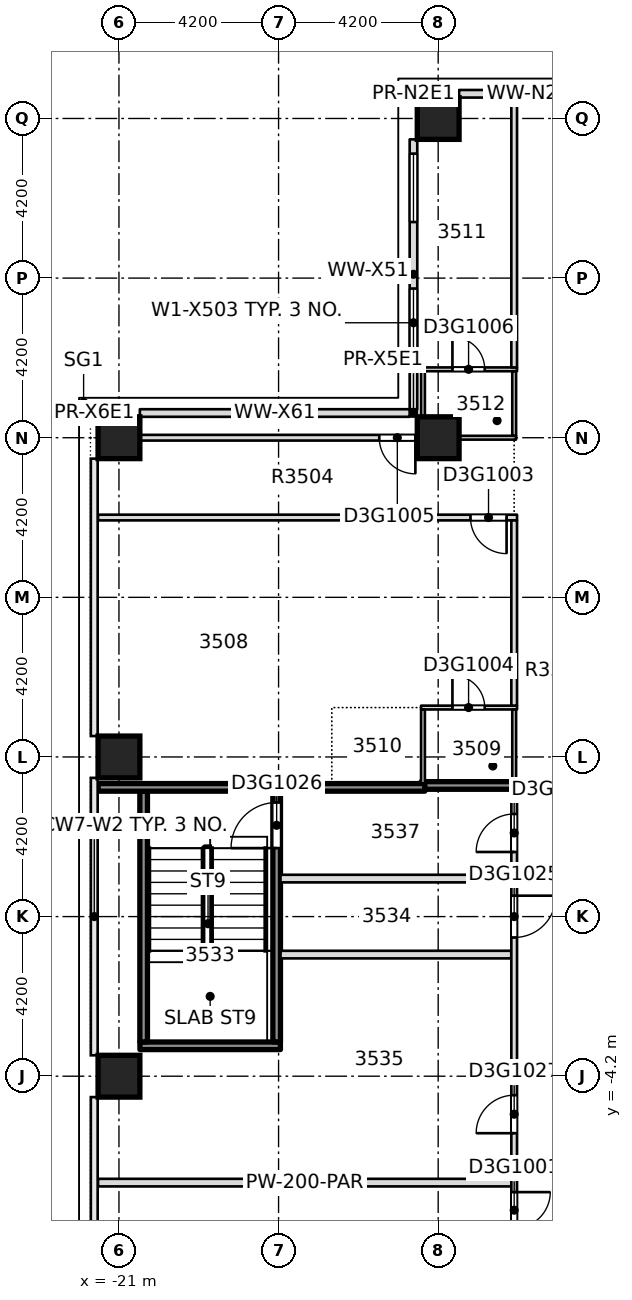
"""IFC4 building model, lengths in metres.
Left out: names, types, materials, properties, quantities, classifications, styles, units other than length and angle.
Written with IfcOpenShell. Run it as: python <this file> out.ifc"""

import sys

from ifc_helpers import new_model, si_unit, direction, frame, frame_2d, origin, origin_2d, place, context, subcontext, project, spatial, rectangle, extrude, element, fill, save


model = new_model("IFC4")
c1 = context("Model", 3, precision=1e-05, world=origin(), true_north=direction((0.0, 1.0)))
c2 = subcontext(c1, "Body", "Model", "MODEL_VIEW")
j1 = project(units=[si_unit("LENGTHUNIT", "METRE"), si_unit("PLANEANGLEUNIT", "RADIAN")], contexts=[c1])
p1 = place(None, origin())
s1 = spatial("IfcSite", under=j1, at=p1, CompositionType="ELEMENT")
p2 = place(p1, origin())
s2 = spatial("IfcBuilding", under=s1, at=p2, CompositionType="ELEMENT")
p3 = place(p2, frame((0.0, 0.0, 140.0)))
s3 = spatial("IfcBuildingStorey", under=s2, at=p3, CompositionType="ELEMENT", Elevation=140.0)
for number, where, z_axis, x_axis in (
    (1, (-21.0, -4.2, -0.4), (0.0, 0.0, 1.0), (1.0, 0.0, 0.0)),
    (2, (-21.0, 4.2, -0.4), (0.0, 0.0, 1.0), (1.0, 0.0, 0.0)),
    (3, (-21.0, 12.6, -0.4), (0.0, 0.0, 1.0), (1.0, 0.0, 0.0)),
    (4, (-12.6, 12.6, -0.4), (0.0, 0.0, 1.0), (1.0, 0.0, 0.0)),
    (5, (-12.6, 21.0, -0.4), (0.0, 0.0, 1.0), (1.0, 0.0, 0.0)),
):
    element("IfcColumn", number, at=place(p3, frame(where, z_axis=z_axis, x_axis=x_axis)), inside=s3, PredefinedType="COLUMN", context=c2, shape_type="SweptSolid", body=[
        extrude(rectangle(XDim=1.1, YDim=1.1, at=origin_2d()), origin(), (0.0, 0.0, 1.0), 3.45),
    ])
p4 = place(p3, frame((-21.55, -7.0, 0.0), z_axis=(0.0, 0.0, 1.0), x_axis=(1.0, 0.0, 0.0)))
e6 = element("IfcWall", 6, at=p4, inside=s3, PredefinedType="PARTITIONING", context=c2, shape_type="SweptSolid", body=[
    extrude(rectangle(XDim=10.875, YDim=0.2, at=frame_2d((5.438, 0.0))), origin(), (0.0, 0.0, 1.0), 3.05),
])
p5 = place(p3, frame((-20.448, -3.4, 0.0), z_axis=(0.0, 0.0, 1.0), x_axis=(1.0, 0.0, 0.0)))
e7 = element("IfcWall", 7, at=p5, inside=s3, PredefinedType="SOLIDWALL", context=c2, shape_type="SweptSolid", body=[
    extrude(rectangle(XDim=3.696, YDim=0.2, at=frame_2d((1.848, 0.0))), origin(), (0.0, 0.0, 1.0), 3.05),
])
p6 = place(p3, frame((-16.748, -1.0, 0.0), z_axis=(0.0, 0.0, 1.0), x_axis=(1.0, 0.0, 0.0)))
e8 = element("IfcWall", 8, at=p6, inside=s3, PredefinedType="PARTITIONING", context=c2, shape_type="SweptSolid", body=[
    extrude(rectangle(XDim=6.071, YDim=0.2, at=frame_2d((3.036, 0.0))), origin(), (0.0, 0.0, 1.0), 3.05),
])
p7 = place(p3, frame((-16.75, 1.0, 0.0), z_axis=(0.0, 0.0, 1.0), x_axis=(1.0, 0.0, 0.0)))
e9 = element("IfcWall", 9, at=p7, inside=s3, PredefinedType="PARTITIONING", context=c2, shape_type="SweptSolid", body=[
    extrude(rectangle(XDim=6.075, YDim=0.2, at=frame_2d((3.038, 0.0))), origin(), (0.0, 0.0, 1.0), 3.05),
])
p8 = place(p3, frame((-13.05, 3.45, 0.0), z_axis=(0.0, 0.0, 1.0), x_axis=(1.0, 0.0, 0.0)))
e10 = element("IfcWall", 10, at=p8, inside=s3, PredefinedType="SOLIDWALL", context=c2, shape_type="SweptSolid", body=[
    extrude(rectangle(XDim=2.525, YDim=0.2, at=frame_2d((1.263, 0.0))), origin(), (0.0, 0.0, 1.0), 3.05),
])
p9 = place(p3, frame((-13.05, 5.5, 0.0), z_axis=(0.0, 0.0, 1.0), x_axis=(1.0, 0.0, 0.0)))
e11 = element("IfcWall", 11, at=p9, inside=s3, PredefinedType="PARTITIONING", context=c2, shape_type="SweptSolid", body=[
    extrude(rectangle(XDim=2.525, YDim=0.1, at=frame_2d((1.263, 0.0))), origin(), (0.0, 0.0, 1.0), 3.05),
])
p10 = place(p9, frame((0.825, 0.0, 0.0)))
e12 = element("IfcOpeningElement", 12, at=p10, cuts=e11, PredefinedType="OPENING", context=c2, shape_type="SweptSolid", body=[
    extrude(rectangle(XDim=0.85, YDim=2.1, at=frame_2d((0.425, 1.05))), frame((0.0, 0.06, 0.0), z_axis=(0.0, -1.0, 0.0), x_axis=(1.0, 0.0, 0.0)), (0.0, 0.0, 1.0), 0.12),
])
p11 = place(p3, frame((-21.55, 10.5, 0.0), z_axis=(0.0, 0.0, 1.0), x_axis=(1.0, 0.0, 0.0)))
e13 = element("IfcWall", 13, at=p11, inside=s3, PredefinedType="PARTITIONING", context=c2, shape_type="SweptSolid", body=[
    extrude(rectangle(XDim=11.025, YDim=0.15, at=frame_2d((5.513, 0.0))), origin(), (0.0, 0.0, 1.0), 3.05),
])
p12 = place(p11, frame((9.8, 0.0, 0.0)))
e14 = element("IfcOpeningElement", 14, at=p12, cuts=e13, PredefinedType="OPENING", context=c2, shape_type="SweptSolid", body=[
    extrude(rectangle(XDim=0.95, YDim=2.1, at=frame_2d((0.475, 1.05))), frame((0.0, 0.085, 0.0), z_axis=(0.0, -1.0, 0.0), x_axis=(1.0, 0.0, 0.0)), (0.0, 0.0, 1.0), 0.17),
])
p13 = place(p3, frame((-21.55, 12.6, 0.0), z_axis=(0.0, 0.0, 1.0), x_axis=(1.0, 0.0, 0.0)))
e15 = element("IfcWall", 15, at=p13, inside=s3, PredefinedType="PARTITIONING", context=c2, shape_type="SweptSolid", body=[
    extrude(rectangle(XDim=1.1, YDim=0.15, at=frame_2d((0.55, 0.0))), origin(), (0.0, 0.0, 1.0), 3.05),
])
p14 = place(p3, frame((-13.05, 12.6, 0.0), z_axis=(0.0, 0.0, 1.0), x_axis=(1.0, 0.0, 0.0)))
e16 = element("IfcWall", 16, at=p14, inside=s3, PredefinedType="PARTITIONING", context=c2, shape_type="SweptSolid", body=[
    extrude(rectangle(XDim=2.5, YDim=0.1, at=frame_2d((1.25, 0.0))), origin(), (0.0, 0.0, 1.0), 3.05),
])
p15 = place(p3, frame((-13.05, 14.4, 0.0), z_axis=(0.0, 0.0, 1.0), x_axis=(1.0, 0.0, 0.0)))
e17 = element("IfcWall", 17, at=p15, inside=s3, PredefinedType="PARTITIONING", context=c2, shape_type="SweptSolid", body=[
    extrude(rectangle(XDim=2.525, YDim=0.1, at=frame_2d((1.263, 0.0))), origin(), (0.0, 0.0, 1.0), 3.05),
])
p16 = place(p15, frame((0.825, 0.0, 0.0)))
e18 = element("IfcOpeningElement", 18, at=p16, cuts=e17, PredefinedType="OPENING", context=c2, shape_type="SweptSolid", body=[
    extrude(rectangle(XDim=0.85, YDim=2.1, at=frame_2d((0.425, 1.05))), frame((0.0, 0.06, 0.0), z_axis=(0.0, -1.0, 0.0), x_axis=(1.0, 0.0, 0.0)), (0.0, 0.0, 1.0), 0.12),
])
p17 = place(p3, frame((-20.35, -3.298, 0.0), z_axis=(0.0, 0.0, 1.0), x_axis=(0.0, 1.0, 0.0)))
e19 = element("IfcWall", 19, at=p17, inside=s3, PredefinedType="SOLIDWALL", context=c2, shape_type="SweptSolid", body=[
    extrude(rectangle(XDim=6.596, YDim=0.2, at=frame_2d((3.298, 0.0))), origin(), (0.0, 0.0, 1.0), 3.05),
])
p18 = place(p3, frame((-16.85, -3.298, 0.0), z_axis=(0.0, 0.0, 1.0), x_axis=(0.0, 1.0, 0.0)))
e20 = element("IfcWall", 20, at=p18, inside=s3, PredefinedType="SOLIDWALL", context=c2, shape_type="SweptSolid", body=[
    extrude(rectangle(XDim=6.598, YDim=0.2, at=frame_2d((3.299, 0.0))), origin(), (0.0, 0.0, 1.0), 3.05),
])
p19 = place(p18, frame((5.1, 0.0, 0.0)))
e21 = element("IfcOpeningElement", 21, at=p19, cuts=e20, PredefinedType="OPENING", context=c2, shape_type="SweptSolid", body=[
    extrude(rectangle(XDim=1.2, YDim=2.1, at=frame_2d((0.6, 1.05))), frame((0.0, 0.11, 0.0), z_axis=(0.0, -1.0, 0.0), x_axis=(1.0, 0.0, 0.0)), (0.0, 0.0, 1.0), 0.22),
])
p20 = place(p3, frame((-13.0, 3.5, 0.0), z_axis=(0.0, 0.0, 1.0), x_axis=(0.0, 1.0, 0.0)))
e22 = element("IfcWall", 22, at=p20, inside=s3, PredefinedType="PARTITIONING", context=c2, shape_type="SweptSolid", body=[
    extrude(rectangle(XDim=1.95, YDim=0.1, at=frame_2d((0.975, 0.0))), origin(), (0.0, 0.0, 1.0), 3.05),
])
p21 = place(p3, frame((-13.0, 12.675, 0.0), z_axis=(0.0, 0.0, 1.0), x_axis=(0.0, 1.0, 0.0)))
e23 = element("IfcWall", 23, at=p21, inside=s3, PredefinedType="PARTITIONING", context=c2, shape_type="SweptSolid", body=[
    extrude(rectangle(XDim=1.675, YDim=0.1, at=frame_2d((0.837, 0.0))), origin(), (0.0, 0.0, 1.0), 3.05),
])
p22 = place(p3, frame((-10.6, -10.525, 0.0), z_axis=(0.0, 0.0, 1.0), x_axis=(0.0, 1.0, 0.0)))
e24 = element("IfcWall", 24, at=p22, inside=s3, PredefinedType="PARTITIONING", context=c2, shape_type="SweptSolid", body=[
    extrude(rectangle(XDim=13.875, YDim=0.15, at=frame_2d((6.938, 0.0))), origin(), (0.0, 0.0, 1.0), 3.05),
])
p23 = place(p22, frame((2.325, 0.0, 0.0)))
e25 = element("IfcOpeningElement", 25, at=p23, cuts=e24, PredefinedType="OPENING", context=c2, shape_type="SweptSolid", body=[
    extrude(rectangle(XDim=0.95, YDim=2.1, at=frame_2d((0.475, 1.05))), frame((0.0, 0.085, 0.0), z_axis=(0.0, -1.0, 0.0), x_axis=(1.0, 0.0, 0.0)), (0.0, 0.0, 1.0), 0.17),
])
p24 = place(p22, frame((9.975, 0.0, 0.0)))
e26 = element("IfcOpeningElement", 26, at=p24, cuts=e24, PredefinedType="OPENING", context=c2, shape_type="SweptSolid", body=[
    extrude(rectangle(XDim=1.1, YDim=2.1, at=frame_2d((0.55, 1.05))), frame((0.0, 0.085, 0.0), z_axis=(0.0, -1.0, 0.0), x_axis=(1.0, 0.0, 0.0)), (0.0, 0.0, 1.0), 0.17),
])
p25 = place(p22, frame((4.825, 0.0, 0.0)))
e27 = element("IfcOpeningElement", 27, at=p25, cuts=e24, PredefinedType="OPENING", context=c2, shape_type="SweptSolid", body=[
    extrude(rectangle(XDim=1.0, YDim=2.1, at=frame_2d((0.5, 1.05))), frame((0.0, 0.085, 0.0), z_axis=(0.0, -1.0, 0.0), x_axis=(1.0, 0.0, 0.0)), (0.0, 0.0, 1.0), 0.17),
])
p26 = place(p22, frame((12.225, 0.0, 0.0)))
e28 = element("IfcOpeningElement", 28, at=p26, cuts=e24, PredefinedType="OPENING", context=c2, shape_type="SweptSolid", body=[
    extrude(rectangle(XDim=1.0, YDim=2.1, at=frame_2d((0.5, 1.05))), frame((0.0, 0.085, 0.0), z_axis=(0.0, -1.0, 0.0), x_axis=(1.0, 0.0, 0.0)), (0.0, 0.0, 1.0), 0.17),
])
p27 = place(p3, frame((-10.6, 3.45, 0.0), z_axis=(0.0, 0.0, 1.0), x_axis=(0.0, 1.0, 0.0)))
e29 = element("IfcWall", 29, at=p27, inside=s3, PredefinedType="PARTITIONING", context=c2, shape_type="SweptSolid", body=[
    extrude(rectangle(XDim=2.0, YDim=0.1, at=frame_2d((1.0, 0.0))), origin(), (0.0, 0.0, 1.0), 3.05),
])
p28 = place(p3, frame((-10.6, 5.55, 0.0), z_axis=(0.0, 0.0, 1.0), x_axis=(0.0, 1.0, 0.0)))
e30 = element("IfcWall", 30, at=p28, inside=s3, PredefinedType="PARTITIONING", context=c2, shape_type="SweptSolid", body=[
    extrude(rectangle(XDim=4.875, YDim=0.15, at=frame_2d((2.438, 0.0))), origin(), (0.0, 0.0, 1.0), 3.05),
])
p29 = place(p3, frame((-10.6, 12.65, 0.0), z_axis=(0.0, 0.0, 1.0), x_axis=(0.0, 1.0, 0.0)))
e31 = element("IfcWall", 31, at=p29, inside=s3, PredefinedType="PARTITIONING", context=c2, shape_type="SweptSolid", body=[
    extrude(rectangle(XDim=1.7, YDim=0.1, at=frame_2d((0.85, 0.0))), origin(), (0.0, 0.0, 1.0), 3.05),
])
p30 = place(p3, frame((-10.6, 14.45, 0.0), z_axis=(0.0, 0.0, 1.0), x_axis=(0.0, 1.0, 0.0)))
e32 = element("IfcWall", 32, at=p30, inside=s3, PredefinedType="PARTITIONING", context=c2, shape_type="SweptSolid", body=[
    extrude(rectangle(XDim=7.1, YDim=0.15, at=frame_2d((3.55, 0.0))), origin(), (0.0, 0.0, 1.0), 3.05),
])
p31 = place(p3, frame((-8.4, 21.65, 0.0), z_axis=(0.0, 0.0, 1.0), x_axis=(-1.0, 0.0, 0.0)))
e33 = element("IfcWall", 33, at=p31, inside=s3, PredefinedType="STANDARD", context=c2, shape_type="SweptSolid", body=[
    extrude(rectangle(XDim=3.65, YDim=0.2, at=frame_2d((1.825, 0.0))), origin(), (0.0, 0.0, 1.0), 3.05),
])
p32 = place(p31, frame((0.375, 0.0, 0.2)))
e34 = element("IfcOpeningElement", 34, at=p32, cuts=e33, PredefinedType="OPENING", context=c2, shape_type="SweptSolid", body=[
    extrude(rectangle(XDim=1.8, YDim=2.65, at=frame_2d((0.9, 1.325))), frame((0.0, 0.11, 0.0), z_axis=(0.0, -1.0, 0.0), x_axis=(1.0, 0.0, 0.0)), (0.0, 0.0, 1.0), 0.22),
])
p33 = place(p3, frame((-13.25, 20.45, 0.0), z_axis=(0.0, 0.0, 1.0), x_axis=(0.0, -1.0, 0.0)))
e35 = element("IfcWall", 35, at=p33, inside=s3, PredefinedType="STANDARD", context=c2, shape_type="SweptSolid", body=[
    extrude(rectangle(XDim=7.1, YDim=0.2, at=frame_2d((3.55, 0.0))), origin(), (0.0, 0.0, 1.0), 3.05),
])
p34 = place(p33, frame((3.925, 0.0, 0.2)))
e36 = element("IfcOpeningElement", 36, at=p34, cuts=e35, PredefinedType="OPENING", context=c2, shape_type="SweptSolid", body=[
    extrude(rectangle(XDim=1.8, YDim=2.65, at=frame_2d((0.9, 1.325))), frame((0.0, 0.11, 0.0), z_axis=(0.0, -1.0, 0.0), x_axis=(1.0, 0.0, 0.0)), (0.0, 0.0, 1.0), 0.22),
])
p35 = place(p33, frame((0.375, 0.0, 0.2)))
e37 = element("IfcOpeningElement", 37, at=p35, cuts=e35, PredefinedType="OPENING", context=c2, shape_type="SweptSolid", body=[
    extrude(rectangle(XDim=1.8, YDim=2.65, at=frame_2d((0.9, 1.325))), frame((0.0, 0.11, 0.0), z_axis=(0.0, -1.0, 0.0), x_axis=(1.0, 0.0, 0.0)), (0.0, 0.0, 1.0), 0.22),
])
p36 = place(p3, frame((-13.35, 13.25, 0.0), z_axis=(0.0, 0.0, 1.0), x_axis=(-1.0, 0.0, 0.0)))
e38 = element("IfcWall", 38, at=p36, inside=s3, PredefinedType="STANDARD", context=c2, shape_type="SweptSolid", body=[
    extrude(rectangle(XDim=7.1, YDim=0.2, at=frame_2d((3.55, 0.0))), origin(), (0.0, 0.0, 1.0), 3.05),
])
p37 = place(p3, frame((-21.55, 3.4, 0.0), z_axis=(0.0, 0.0, 1.0), x_axis=(1.0, 0.0, 0.0)))
e39 = element("IfcWall", 39, at=p37, inside=s3, PredefinedType="SOLIDWALL", context=c2, shape_type="SweptSolid", body=[
    extrude(rectangle(XDim=8.6, YDim=0.2, at=frame_2d((4.3, 0.0))), origin(), (0.0, 0.0, 1.0), 3.05),
])
p38 = place(p3, frame((-20.45, 12.6, 0.0), z_axis=(0.0, 0.0, 1.0), x_axis=(1.0, 0.0, 0.0)))
e40 = element("IfcWall", 40, at=p38, inside=s3, PredefinedType="PARTITIONING", context=c2, shape_type="SweptSolid", body=[
    extrude(rectangle(XDim=7.3, YDim=0.15, at=frame_2d((3.65, 0.0))), origin(), (0.0, 0.0, 1.0), 2.5),
])
p39 = place(p38, frame((6.3, 0.0, 0.0)))
e41 = element("IfcOpeningElement", 41, at=p39, cuts=e40, PredefinedType="OPENING", context=c2, shape_type="SweptSolid", body=[
    extrude(rectangle(XDim=0.95, YDim=2.1, at=frame_2d((0.475, 1.05))), frame((0.0, 0.085, 0.0), z_axis=(0.0, -1.0, 0.0), x_axis=(1.0, 0.0, 0.0)), (0.0, 0.0, 1.0), 0.17),
])
p40 = place(p3, frame((-13.15, 12.6, 0.0), z_axis=(0.0, 0.0, 1.0), x_axis=(1.0, 0.0, 0.0)))
e42 = element("IfcWall", 42, at=p40, inside=s3, PredefinedType="PARTITIONING", context=c2, shape_type="SweptSolid", body=[
    extrude(rectangle(XDim=0.2, YDim=0.15, at=frame_2d((0.1, 0.0))), origin(), (0.0, 0.0, 1.0), 3.05),
])
p41 = place(p23, origin())
e43 = element("IfcDoor", 43, at=p41, inside=s3, OperationType="SINGLE_SWING_RIGHT", PredefinedType="DOOR", context=c2, shape_type="SweptSolid", body=[
    extrude(rectangle(XDim=0.95, YDim=2.1, at=frame_2d((0.475, 1.05))), frame((0.0, 0.025, 0.0), z_axis=(0.0, -1.0, 0.0), x_axis=(1.0, 0.0, 0.0)), (0.0, 0.0, 1.0), 0.05),
])
fill(e25, e43)
p42 = place(p12, origin())
e44 = element("IfcDoor", 44, at=p42, inside=s3, OperationType="SINGLE_SWING_RIGHT", PredefinedType="DOOR", context=c2, shape_type="SweptSolid", body=[
    extrude(rectangle(XDim=0.95, YDim=2.1, at=frame_2d((0.475, 1.05))), frame((0.0, 0.025, 0.0), z_axis=(0.0, -1.0, 0.0), x_axis=(1.0, 0.0, 0.0)), (0.0, 0.0, 1.0), 0.05),
])
fill(e14, e44)
p43 = place(p10, origin())
e45 = element("IfcDoor", 45, at=p43, inside=s3, OperationType="SINGLE_SWING_RIGHT", PredefinedType="DOOR", context=c2, shape_type="SweptSolid", body=[
    extrude(rectangle(XDim=0.85, YDim=2.1, at=frame_2d((0.425, 1.05))), frame((0.0, 0.025, 0.0), z_axis=(0.0, -1.0, 0.0), x_axis=(1.0, 0.0, 0.0)), (0.0, 0.0, 1.0), 0.05),
])
fill(e12, e45)
p44 = place(p39, origin())
e46 = element("IfcDoor", 46, at=p44, inside=s3, OperationType="SINGLE_SWING_LEFT", PredefinedType="DOOR", context=c2, shape_type="SweptSolid", body=[
    extrude(rectangle(XDim=0.95, YDim=2.1, at=frame_2d((0.475, 1.05))), frame((0.0, 0.025, 0.0), z_axis=(0.0, -1.0, 0.0), x_axis=(1.0, 0.0, 0.0)), (0.0, 0.0, 1.0), 0.05),
])
fill(e41, e46)
p45 = place(p16, origin())
e47 = element("IfcDoor", 47, at=p45, inside=s3, OperationType="SINGLE_SWING_RIGHT", PredefinedType="DOOR", context=c2, shape_type="SweptSolid", body=[
    extrude(rectangle(XDim=0.85, YDim=2.1, at=frame_2d((0.425, 1.05))), frame((0.0, 0.025, 0.0), z_axis=(0.0, -1.0, 0.0), x_axis=(1.0, 0.0, 0.0)), (0.0, 0.0, 1.0), 0.05),
])
fill(e18, e47)
p46 = place(p24, origin())
e48 = element("IfcDoor", 48, at=p46, inside=s3, OperationType="SINGLE_SWING_RIGHT", PredefinedType="DOOR", context=c2, shape_type="SweptSolid", body=[
    extrude(rectangle(XDim=1.1, YDim=2.1, at=frame_2d((0.55, 1.05))), frame((0.0, 0.025, 0.0), z_axis=(0.0, -1.0, 0.0), x_axis=(1.0, 0.0, 0.0)), (0.0, 0.0, 1.0), 0.05),
])
fill(e26, e48)
p47 = place(p19, origin())
e49 = element("IfcDoor", 49, at=p47, inside=s3, OperationType="SINGLE_SWING_RIGHT", PredefinedType="DOOR", context=c2, shape_type="SweptSolid", body=[
    extrude(rectangle(XDim=1.2, YDim=2.1, at=frame_2d((0.6, 1.05))), frame((0.0, 0.025, 0.0), z_axis=(0.0, -1.0, 0.0), x_axis=(1.0, 0.0, 0.0)), (0.0, 0.0, 1.0), 0.05),
])
fill(e21, e49)
p48 = place(p25, origin())
e50 = element("IfcDoor", 50, at=p48, inside=s3, OperationType="SINGLE_SWING_RIGHT", PredefinedType="DOOR", context=c2, shape_type="SweptSolid", body=[
    extrude(rectangle(XDim=1.0, YDim=2.1, at=frame_2d((0.5, 1.05))), frame((0.0, 0.025, 0.0), z_axis=(0.0, -1.0, 0.0), x_axis=(1.0, 0.0, 0.0)), (0.0, 0.0, 1.0), 0.05),
])
fill(e27, e50)
p49 = place(p26, origin())
e51 = element("IfcDoor", 51, at=p49, inside=s3, OperationType="SINGLE_SWING_RIGHT", PredefinedType="DOOR", context=c2, shape_type="SweptSolid", body=[
    extrude(rectangle(XDim=1.0, YDim=2.1, at=frame_2d((0.5, 1.05))), frame((0.0, 0.025, 0.0), z_axis=(0.0, -1.0, 0.0), x_axis=(1.0, 0.0, 0.0)), (0.0, 0.0, 1.0), 0.05),
])
fill(e28, e51)
p50 = place(p32, origin())
e52 = element("IfcWindow", 52, at=p50, inside=s3, PartitioningType="SINGLE_PANEL", PredefinedType="WINDOW", context=c2, shape_type="SweptSolid", body=[
    extrude(rectangle(XDim=1.8, YDim=2.65, at=frame_2d((0.9, 1.325))), frame((0.0, 0.03, 0.0), z_axis=(0.0, -1.0, 0.0), x_axis=(1.0, 0.0, 0.0)), (0.0, 0.0, 1.0), 0.06),
])
fill(e34, e52)
p51 = place(p34, origin())
e53 = element("IfcWindow", 53, at=p51, inside=s3, PartitioningType="SINGLE_PANEL", PredefinedType="WINDOW", context=c2, shape_type="SweptSolid", body=[
    extrude(rectangle(XDim=1.8, YDim=2.65, at=frame_2d((0.9, 1.325))), frame((0.0, 0.03, 0.0), z_axis=(0.0, -1.0, 0.0), x_axis=(1.0, 0.0, 0.0)), (0.0, 0.0, 1.0), 0.06),
])
fill(e36, e53)
p52 = place(p35, origin())
e54 = element("IfcWindow", 54, at=p52, inside=s3, PartitioningType="SINGLE_PANEL", PredefinedType="WINDOW", context=c2, shape_type="SweptSolid", body=[
    extrude(rectangle(XDim=1.8, YDim=2.65, at=frame_2d((0.9, 1.325))), frame((0.0, 0.03, 0.0), z_axis=(0.0, -1.0, 0.0), x_axis=(1.0, 0.0, 0.0)), (0.0, 0.0, 1.0), 0.06),
])
fill(e37, e54)
save(model, sys.argv[1])
